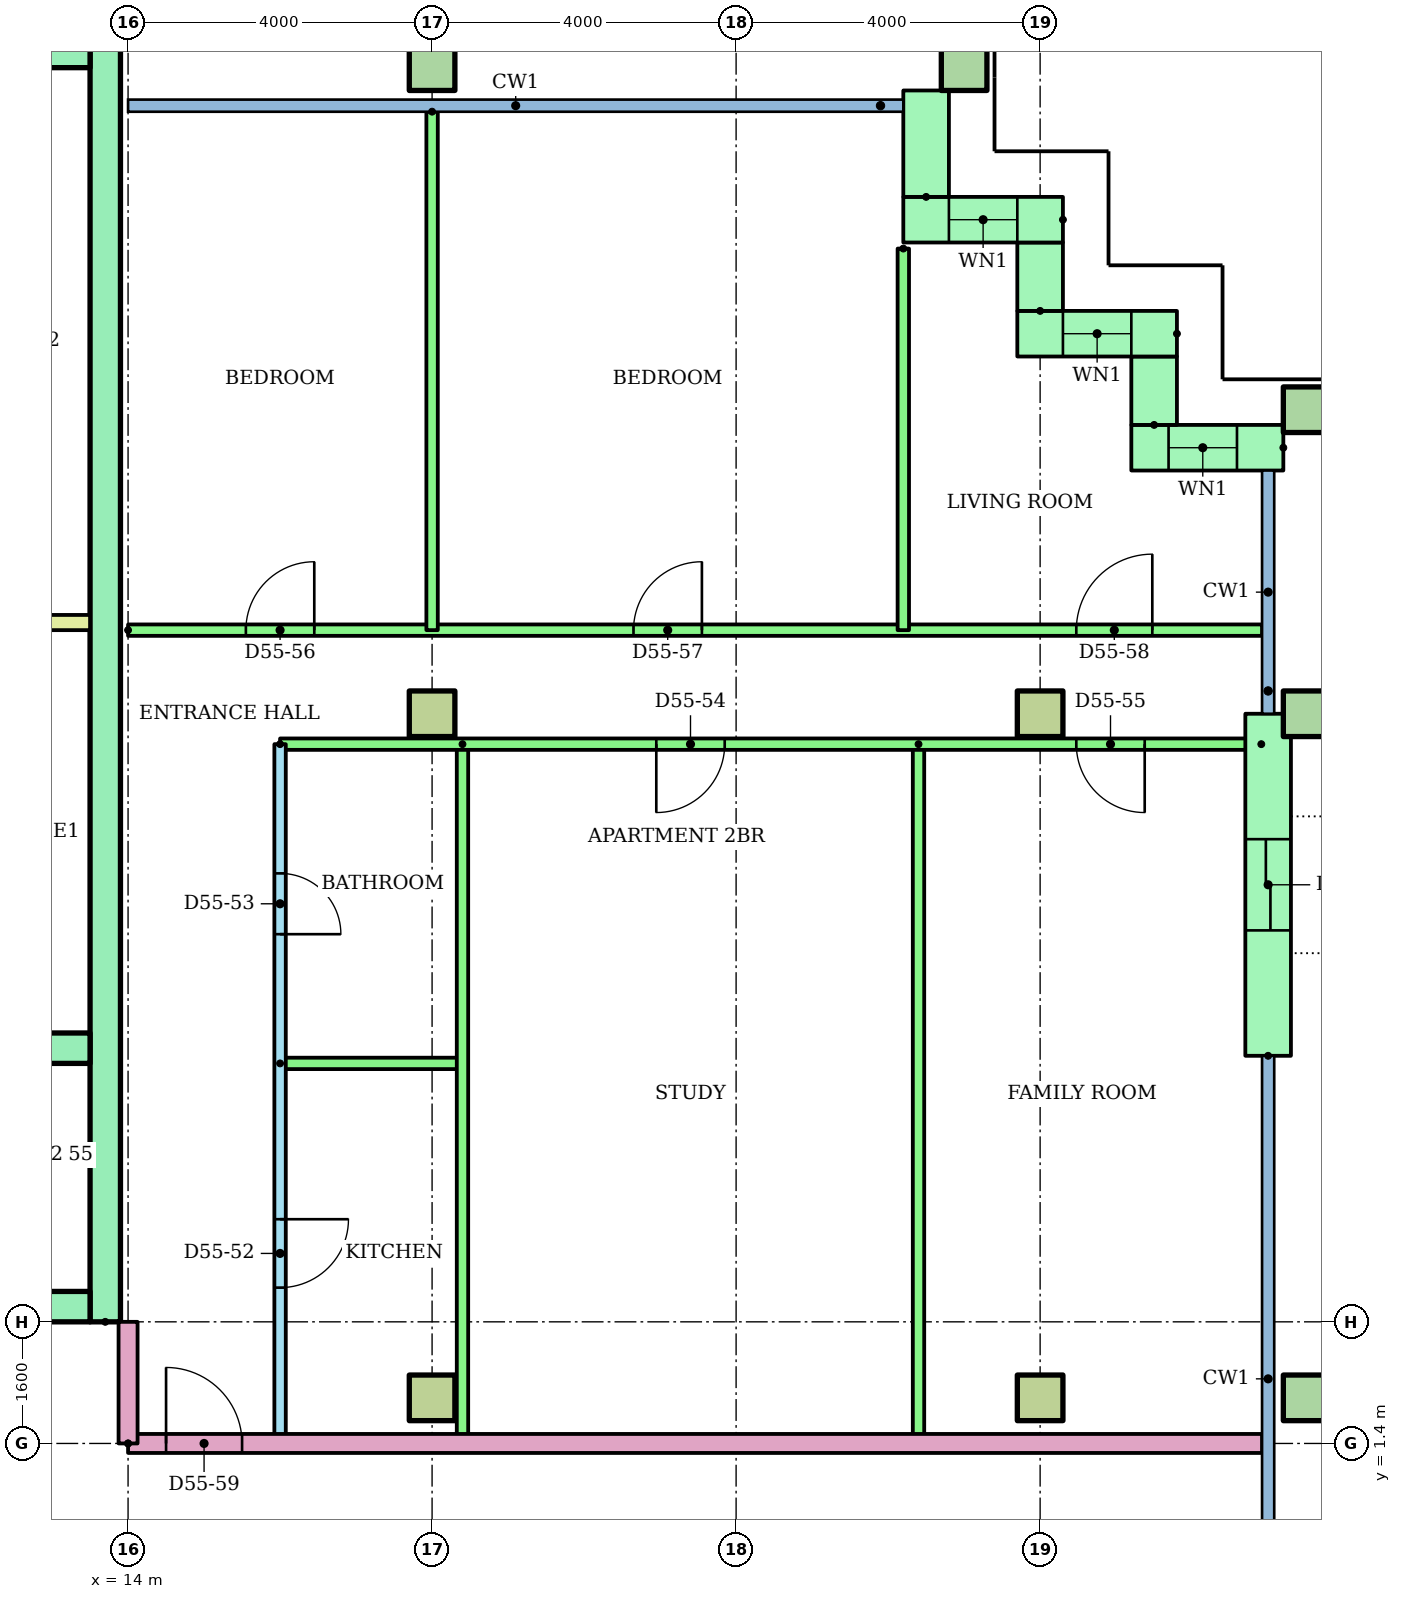
"""IFC4 building model, lengths in metres.
Left out: names, types, materials, properties, quantities, classifications, styles, units other than length and angle.
Written with IfcOpenShell. Run it as: python <this file> out.ifc"""

import sys

from ifc_helpers import new_model, si_unit, direction, frame, frame_2d, origin, origin_2d, place, context, subcontext, project, spatial, rectangle, hollow_rectangle, extrude, element, fill, save


model = new_model("IFC4")
c1 = context("Model", 3, precision=1e-05, world=origin(), true_north=direction((0.0, 1.0)))
c2 = subcontext(c1, "Body", "Model", "MODEL_VIEW")
j1 = project(units=[si_unit("LENGTHUNIT", "METRE"), si_unit("PLANEANGLEUNIT", "RADIAN")], contexts=[c1])
p1 = place(None, origin())
s1 = spatial("IfcSite", under=j1, at=p1, CompositionType="ELEMENT")
p2 = place(p1, origin())
s2 = spatial("IfcBuilding", under=s1, at=p2, CompositionType="ELEMENT")
p3 = place(p2, frame((0.0, 0.0, 214.0)))
s3 = spatial("IfcBuildingStorey", under=s2, at=p3, CompositionType="ELEMENT", Elevation=214.0)
for number, where in (
    (1, (18.0, 2.0, 0.0)),
    (2, (26.0, 2.0, 0.0)),
):
    element("IfcColumn", number, at=place(p3, frame(where)), inside=s3, PredefinedType="COLUMN", context=c2, shape_type="SweptSolid", body=[
        extrude(rectangle(XDim=0.6, YDim=0.6, at=origin_2d()), origin(), (0.0, 0.0, 1.0), 3.2),
    ])
p4 = place(p3, frame((29.5, 2.0, 0.0)))
e3 = element("IfcColumn", 3, at=p4, inside=s3, PredefinedType="COLUMN", context=c2, shape_type="SweptSolid", body=[
    extrude(hollow_rectangle(XDim=0.6, YDim=0.6, WallThickness=0.03, at=origin_2d()), origin(), (0.0, 0.0, 1.0), 3.2),
])
for number, where in (
    (4, (18.0, 11.0, 0.0)),
    (5, (26.0, 11.0, 0.0)),
):
    element("IfcColumn", number, at=place(p3, frame(where)), inside=s3, PredefinedType="COLUMN", context=c2, shape_type="SweptSolid", body=[
        extrude(rectangle(XDim=0.6, YDim=0.6, at=origin_2d()), origin(), (0.0, 0.0, 1.0), 3.2),
    ])
for number, where in (
    (6, (29.5, 11.0, 0.0)),
    (7, (29.5, 15.0, 0.0)),
    (8, (18.0, 19.5, 0.0)),
    (9, (25.0, 19.5, 0.0)),
):
    element("IfcColumn", number, at=place(p3, frame(where)), inside=s3, PredefinedType="COLUMN", context=c2, shape_type="SweptSolid", body=[
        extrude(hollow_rectangle(XDim=0.6, YDim=0.6, WallThickness=0.03, at=origin_2d()), origin(), (0.0, 0.0, 1.0), 3.2),
    ])
p5 = place(p3, frame((29.2, 14.5, 0.0), z_axis=(0.0, 0.0, 1.0), x_axis=(-1.0, 0.0, 0.0)))
e10 = element("IfcWall", 10, at=p5, inside=s3, PredefinedType="STANDARD", context=c2, shape_type="SweptSolid", body=[
    extrude(rectangle(XDim=2.0, YDim=0.6, at=frame_2d((1.0, 0.0))), origin(), (0.0, 0.0, 1.0), 2.92),
])
p6 = place(p5, frame((0.61, 0.0, 0.9)))
e11 = element("IfcOpeningElement", 11, at=p6, cuts=e10, PredefinedType="OPENING", context=c2, shape_type="SweptSolid", body=[
    extrude(rectangle(XDim=0.9, YDim=1.5, at=frame_2d((0.45, 0.75))), frame((0.0, 0.31, 0.0), z_axis=(0.0, -1.0, 0.0), x_axis=(1.0, 0.0, 0.0)), (0.0, 0.0, 1.0), 0.62),
])
p7 = place(p3, frame((27.5, 14.8, 0.0), z_axis=(0.0, 0.0, 1.0), x_axis=(0.0, 1.0, 0.0)))
e12 = element("IfcWall", 12, at=p7, inside=s3, PredefinedType="STANDARD", context=c2, shape_type="SweptSolid", body=[
    extrude(rectangle(XDim=0.9, YDim=0.6, at=frame_2d((0.45, 0.0))), origin(), (0.0, 0.0, 1.0), 2.92),
])
p8 = place(p3, frame((27.8, 16.0, 0.0), z_axis=(0.0, 0.0, 1.0), x_axis=(-1.0, 0.0, 0.0)))
e13 = element("IfcWall", 13, at=p8, inside=s3, PredefinedType="STANDARD", context=c2, shape_type="SweptSolid", body=[
    extrude(rectangle(XDim=2.1, YDim=0.6, at=frame_2d((1.05, 0.0))), origin(), (0.0, 0.0, 1.0), 2.92),
])
p9 = place(p8, frame((0.6, 0.0, 0.9)))
e14 = element("IfcOpeningElement", 14, at=p9, cuts=e13, PredefinedType="OPENING", context=c2, shape_type="SweptSolid", body=[
    extrude(rectangle(XDim=0.9, YDim=1.5, at=frame_2d((0.45, 0.75))), frame((0.0, 0.31, 0.0), z_axis=(0.0, -1.0, 0.0), x_axis=(1.0, 0.0, 0.0)), (0.0, 0.0, 1.0), 0.62),
])
p10 = place(p3, frame((26.0, 16.3, 0.0), z_axis=(0.0, 0.0, 1.0), x_axis=(0.0, 1.0, 0.0)))
e15 = element("IfcWall", 15, at=p10, inside=s3, PredefinedType="STANDARD", context=c2, shape_type="SweptSolid", body=[
    extrude(rectangle(XDim=0.9, YDim=0.6, at=frame_2d((0.45, 0.0))), origin(), (0.0, 0.0, 1.0), 2.92),
])
p11 = place(p3, frame((26.3, 17.5, 0.0), z_axis=(0.0, 0.0, 1.0), x_axis=(-1.0, 0.0, 0.0)))
e16 = element("IfcWall", 16, at=p11, inside=s3, PredefinedType="STANDARD", context=c2, shape_type="SweptSolid", body=[
    extrude(rectangle(XDim=2.1, YDim=0.6, at=frame_2d((1.05, 0.0))), origin(), (0.0, 0.0, 1.0), 2.92),
])
p12 = place(p11, frame((0.6, 0.0, 0.9)))
e17 = element("IfcOpeningElement", 17, at=p12, cuts=e16, PredefinedType="OPENING", context=c2, shape_type="SweptSolid", body=[
    extrude(rectangle(XDim=0.9, YDim=1.5, at=frame_2d((0.45, 0.75))), frame((0.0, 0.31, 0.0), z_axis=(0.0, -1.0, 0.0), x_axis=(1.0, 0.0, 0.0)), (0.0, 0.0, 1.0), 0.62),
])
p13 = place(p3, frame((24.5, 17.8, 0.0), z_axis=(0.0, 0.0, 1.0), x_axis=(0.0, 1.0, 0.0)))
e18 = element("IfcWall", 18, at=p13, inside=s3, PredefinedType="STANDARD", context=c2, shape_type="SweptSolid", body=[
    extrude(rectangle(XDim=1.4, YDim=0.6, at=frame_2d((0.7, 0.0))), origin(), (0.0, 0.0, 1.0), 2.92),
])
p14 = place(p3, frame((29.0, 6.5, 0.0), z_axis=(0.0, 0.0, 1.0), x_axis=(0.0, 1.0, 0.0)))
e19 = element("IfcWall", 19, at=p14, inside=s3, PredefinedType="STANDARD", context=c2, shape_type="SweptSolid", body=[
    extrude(rectangle(XDim=4.5, YDim=0.6, at=frame_2d((2.25, 0.0))), origin(), (0.0, 0.0, 1.0), 2.92),
])
p15 = place(p14, frame((1.65, 0.0, 0.0)))
e20 = element("IfcOpeningElement", 20, at=p15, cuts=e19, PredefinedType="OPENING", context=c2, shape_type="SweptSolid", body=[
    extrude(rectangle(XDim=1.2, YDim=2.1, at=frame_2d((0.6, 1.05))), frame((0.0, 0.31, 0.0), z_axis=(0.0, -1.0, 0.0), x_axis=(1.0, 0.0, 0.0)), (0.0, 0.0, 1.0), 0.62),
])
p16 = place(p3, frame((13.7, 3.0, 0.0), z_axis=(0.0, 0.0, 1.0), x_axis=(0.0, 1.0, 0.0)))
e21 = element("IfcWall", 21, at=p16, inside=s3, PredefinedType="SHEAR", context=c2, shape_type="SweptSolid", body=[
    extrude(rectangle(XDim=17.0, YDim=0.4, at=frame_2d((8.5, 0.0))), origin(), (0.0, 0.0, 1.0), 2.92),
])
p17 = place(p3, frame((-13.5, 19.7, 0.0)))
e22 = element("IfcWall", 22, at=p17, inside=s3, PredefinedType="SHEAR", context=c2, shape_type="SweptSolid", body=[
    extrude(rectangle(XDim=27.0, YDim=0.4, at=frame_2d((13.5, 0.0))), origin(), (0.0, 0.0, 1.0), 2.92),
])
p18 = place(p3, frame((-13.5, 3.2, 0.0)))
e23 = element("IfcWall", 23, at=p18, inside=s3, PredefinedType="SHEAR", context=c2, shape_type="SweptSolid", body=[
    extrude(rectangle(XDim=27.0, YDim=0.4, at=frame_2d((13.5, 0.0))), origin(), (0.0, 0.0, 1.0), 2.92),
])
p19 = place(p18, frame((22.083, 0.0, 0.0)))
e24 = element("IfcOpeningElement", 24, at=p19, cuts=e23, PredefinedType="OPENING", context=c2, shape_type="SweptSolid", body=[
    extrude(rectangle(XDim=1.1, YDim=2.1, at=frame_2d((0.55, 1.05))), frame((0.0, 0.21, 0.0), z_axis=(0.0, -1.0, 0.0), x_axis=(1.0, 0.0, 0.0)), (0.0, 0.0, 1.0), 0.42),
])
p20 = place(p18, frame((25.128, 0.0, 0.0)))
e25 = element("IfcOpeningElement", 25, at=p20, cuts=e23, PredefinedType="OPENING", context=c2, shape_type="SweptSolid", body=[
    extrude(rectangle(XDim=1.1, YDim=2.1, at=frame_2d((0.55, 1.05))), frame((0.0, 0.21, 0.0), z_axis=(0.0, -1.0, 0.0), x_axis=(1.0, 0.0, 0.0)), (0.0, 0.0, 1.0), 0.42),
])
p21 = place(p18, frame((12.6, 0.0, 0.0)))
e26 = element("IfcOpeningElement", 26, at=p21, cuts=e23, PredefinedType="OPENING", context=c2, shape_type="SweptSolid", body=[
    extrude(rectangle(XDim=1.8, YDim=2.1, at=frame_2d((0.9, 1.05))), frame((0.0, 0.21, 0.0), z_axis=(0.0, -1.0, 0.0), x_axis=(1.0, 0.0, 0.0)), (0.0, 0.0, 1.0), 0.42),
])
p22 = place(p3, frame((1.522, 6.6, 0.0)))
e27 = element("IfcWall", 27, at=p22, inside=s3, PredefinedType="SHEAR", context=c2, shape_type="SweptSolid", body=[
    extrude(rectangle(XDim=11.978, YDim=0.4, at=frame_2d((5.989, 0.0))), origin(), (0.0, 0.0, 1.0), 2.92),
])
p23 = place(p22, frame((2.544, 0.0, 0.0)))
e28 = element("IfcOpeningElement", 28, at=p23, cuts=e27, PredefinedType="OPENING", context=c2, shape_type="SweptSolid", body=[
    extrude(rectangle(XDim=1.0, YDim=2.1, at=frame_2d((0.5, 1.05))), frame((0.0, 0.21, 0.0), z_axis=(0.0, -1.0, 0.0), x_axis=(1.0, 0.0, 0.0)), (0.0, 0.0, 1.0), 0.42),
])
p24 = place(p3, frame((9.6, 12.2, 0.0)))
e29 = element("IfcWall", 29, at=p24, inside=s3, PredefinedType="PARTITIONING", context=c2, shape_type="SweptSolid", body=[
    extrude(rectangle(XDim=3.9, YDim=0.2, at=frame_2d((1.95, 0.0))), origin(), (0.0, 0.0, 1.0), 2.92),
])
p25 = place(p3, frame((16.0, 10.6, 0.0), z_axis=(0.0, 0.0, 1.0), x_axis=(0.0, -1.0, 0.0)))
e30 = element("IfcWall", 30, at=p25, inside=s3, PredefinedType="PARTITIONING", context=c2, shape_type="SweptSolid", body=[
    extrude(rectangle(XDim=9.2, YDim=0.15, at=frame_2d((4.6, 0.0))), origin(), (0.0, 0.0, 1.0), 2.4),
])
p26 = place(p25, frame((6.25, 0.0, 0.0)))
e31 = element("IfcOpeningElement", 31, at=p26, cuts=e30, PredefinedType="OPENING", context=c2, shape_type="SweptSolid", body=[
    extrude(rectangle(XDim=0.9, YDim=2.1, at=frame_2d((0.45, 1.05))), frame((0.0, 0.085, 0.0), z_axis=(0.0, -1.0, 0.0), x_axis=(1.0, 0.0, 0.0)), (0.0, 0.0, 1.0), 0.17),
])
p27 = place(p25, frame((1.7, 0.0, 0.0)))
e32 = element("IfcOpeningElement", 32, at=p27, cuts=e30, PredefinedType="OPENING", context=c2, shape_type="SweptSolid", body=[
    extrude(rectangle(XDim=0.8, YDim=2.1, at=frame_2d((0.4, 1.05))), frame((0.0, 0.085, 0.0), z_axis=(0.0, -1.0, 0.0), x_axis=(1.0, 0.0, 0.0)), (0.0, 0.0, 1.0), 0.17),
])
p28 = place(p3, frame((16.0, 6.4, 0.0)))
e33 = element("IfcWall", 33, at=p28, inside=s3, PredefinedType="PARTITIONING", context=c2, shape_type="SweptSolid", body=[
    extrude(rectangle(XDim=2.4, YDim=0.15, at=frame_2d((1.2, 0.0))), origin(), (0.0, 0.0, 1.0), 2.4),
])
for number, where, z_axis, x_axis in (
    (34, (18.4, 10.6, 0.0), (0.0, 0.0, 1.0), (0.0, -1.0, 0.0)),
    (35, (24.4, 10.6, 0.0), (0.0, 0.0, 1.0), (0.0, -1.0, 0.0)),
):
    element("IfcWall", number, at=place(p3, frame(where, z_axis=z_axis, x_axis=x_axis)), inside=s3, PredefinedType="PARTITIONING", context=c2, shape_type="SweptSolid", body=[
        extrude(rectangle(XDim=9.2, YDim=0.15, at=frame_2d((4.6, 0.0))), origin(), (0.0, 0.0, 1.0), 2.4),
    ])
p29 = place(p3, frame((28.91, 10.6, 0.0), z_axis=(0.0, 0.0, 1.0), x_axis=(-1.0, 0.0, 0.0)))
e36 = element("IfcWall", 36, at=p29, inside=s3, PredefinedType="PARTITIONING", context=c2, shape_type="SweptSolid", body=[
    extrude(rectangle(XDim=12.91, YDim=0.15, at=frame_2d((6.455, 0.0))), origin(), (0.0, 0.0, 1.0), 2.4),
])
p30 = place(p29, frame((7.06, 0.0, 0.0)))
e37 = element("IfcOpeningElement", 37, at=p30, cuts=e36, PredefinedType="OPENING", context=c2, shape_type="SweptSolid", body=[
    extrude(rectangle(XDim=0.9, YDim=2.1, at=frame_2d((0.45, 1.05))), frame((0.0, 0.085, 0.0), z_axis=(0.0, -1.0, 0.0), x_axis=(1.0, 0.0, 0.0)), (0.0, 0.0, 1.0), 0.17),
])
p31 = place(p29, frame((1.534, 0.0, 0.0)))
e38 = element("IfcOpeningElement", 38, at=p31, cuts=e36, PredefinedType="OPENING", context=c2, shape_type="SweptSolid", body=[
    extrude(rectangle(XDim=0.9, YDim=2.1, at=frame_2d((0.45, 1.05))), frame((0.0, 0.085, 0.0), z_axis=(0.0, -1.0, 0.0), x_axis=(1.0, 0.0, 0.0)), (0.0, 0.0, 1.0), 0.17),
])
p32 = place(p3, frame((14.0, 12.1, 0.0)))
e39 = element("IfcWall", 39, at=p32, inside=s3, PredefinedType="PARTITIONING", context=c2, shape_type="SweptSolid", body=[
    extrude(rectangle(XDim=14.92, YDim=0.15, at=frame_2d((7.46, 0.0))), origin(), (0.0, 0.0, 1.0), 2.4),
])
p33 = place(p32, frame((1.55, 0.0, 0.0)))
e40 = element("IfcOpeningElement", 40, at=p33, cuts=e39, PredefinedType="OPENING", context=c2, shape_type="SweptSolid", body=[
    extrude(rectangle(XDim=0.9, YDim=2.1, at=frame_2d((0.45, 1.05))), frame((0.0, 0.085, 0.0), z_axis=(0.0, -1.0, 0.0), x_axis=(1.0, 0.0, 0.0)), (0.0, 0.0, 1.0), 0.17),
])
p34 = place(p32, frame((6.65, 0.0, 0.0)))
e41 = element("IfcOpeningElement", 41, at=p34, cuts=e39, PredefinedType="OPENING", context=c2, shape_type="SweptSolid", body=[
    extrude(rectangle(XDim=0.9, YDim=2.1, at=frame_2d((0.45, 1.05))), frame((0.0, 0.085, 0.0), z_axis=(0.0, -1.0, 0.0), x_axis=(1.0, 0.0, 0.0)), (0.0, 0.0, 1.0), 0.17),
])
p35 = place(p32, frame((12.476, 0.0, 0.0)))
e42 = element("IfcOpeningElement", 42, at=p35, cuts=e39, PredefinedType="OPENING", context=c2, shape_type="SweptSolid", body=[
    extrude(rectangle(XDim=1.0, YDim=2.1, at=frame_2d((0.5, 1.05))), frame((0.0, 0.085, 0.0), z_axis=(0.0, -1.0, 0.0), x_axis=(1.0, 0.0, 0.0)), (0.0, 0.0, 1.0), 0.17),
])
p36 = place(p3, frame((18.0, 18.921, 0.0), z_axis=(0.0, 0.0, 1.0), x_axis=(0.0, -1.0, 0.0)))
e43 = element("IfcWall", 43, at=p36, inside=s3, PredefinedType="PARTITIONING", context=c2, shape_type="SweptSolid", body=[
    extrude(rectangle(XDim=6.821, YDim=0.15, at=frame_2d((3.41, 0.0))), origin(), (0.0, 0.0, 1.0), 2.4),
])
p37 = place(p3, frame((24.2, 17.12, 0.0), z_axis=(0.0, 0.0, 1.0), x_axis=(0.0, -1.0, 0.0)))
e44 = element("IfcWall", 44, at=p37, inside=s3, PredefinedType="PARTITIONING", context=c2, shape_type="SweptSolid", body=[
    extrude(rectangle(XDim=5.02, YDim=0.15, at=frame_2d((2.51, 0.0))), origin(), (0.0, 0.0, 1.0), 2.4),
])
p38 = place(p3, frame((14.0, 1.4, 0.0)))
e45 = element("IfcWall", 45, at=p38, inside=s3, PredefinedType="PARTITIONING", context=c2, shape_type="SweptSolid", body=[
    extrude(rectangle(XDim=14.92, YDim=0.25, at=frame_2d((7.46, 0.0))), origin(), (0.0, 0.0, 1.0), 2.4),
])
p39 = place(p38, frame((0.5, 0.0, 0.0)))
e46 = element("IfcOpeningElement", 46, at=p39, cuts=e45, PredefinedType="OPENING", context=c2, shape_type="SweptSolid", body=[
    extrude(rectangle(XDim=1.0, YDim=2.1, at=frame_2d((0.5, 1.05))), frame((0.0, 0.135, 0.0), z_axis=(0.0, -1.0, 0.0), x_axis=(1.0, 0.0, 0.0)), (0.0, 0.0, 1.0), 0.27),
])
p40 = place(p3, frame((14.0, 1.4, 0.0), z_axis=(0.0, 0.0, 1.0), x_axis=(0.0, 1.0, 0.0)))
e47 = element("IfcWall", 47, at=p40, inside=s3, PredefinedType="PARTITIONING", context=c2, shape_type="SweptSolid", body=[
    extrude(rectangle(XDim=1.6, YDim=0.25, at=frame_2d((0.8, 0.0))), origin(), (0.0, 0.0, 1.0), 2.4),
])
p41 = place(p6, origin())
e48 = element("IfcWindow", 48, at=p41, inside=s3, PartitioningType="SINGLE_PANEL", PredefinedType="WINDOW", context=c2, shape_type="SweptSolid", body=[
    extrude(rectangle(XDim=0.9, YDim=1.5, at=frame_2d((0.45, 0.75))), frame((0.0, 0.03, 0.0), z_axis=(0.0, -1.0, 0.0), x_axis=(1.0, 0.0, 0.0)), (0.0, 0.0, 1.0), 0.06),
])
fill(e11, e48)
p42 = place(p9, origin())
e49 = element("IfcWindow", 49, at=p42, inside=s3, PartitioningType="SINGLE_PANEL", PredefinedType="WINDOW", context=c2, shape_type="SweptSolid", body=[
    extrude(rectangle(XDim=0.9, YDim=1.5, at=frame_2d((0.45, 0.75))), frame((0.0, 0.03, 0.0), z_axis=(0.0, -1.0, 0.0), x_axis=(1.0, 0.0, 0.0)), (0.0, 0.0, 1.0), 0.06),
])
fill(e14, e49)
p43 = place(p12, origin())
e50 = element("IfcWindow", 50, at=p43, inside=s3, PartitioningType="SINGLE_PANEL", PredefinedType="WINDOW", context=c2, shape_type="SweptSolid", body=[
    extrude(rectangle(XDim=0.9, YDim=1.5, at=frame_2d((0.45, 0.75))), frame((0.0, 0.03, 0.0), z_axis=(0.0, -1.0, 0.0), x_axis=(1.0, 0.0, 0.0)), (0.0, 0.0, 1.0), 0.06),
])
fill(e17, e50)
p44 = place(p26, origin())
e51 = element("IfcDoor", 51, at=p44, inside=s3, OperationType="SINGLE_SWING_LEFT", PredefinedType="DOOR", context=c2, shape_type="SweptSolid", body=[
    extrude(rectangle(XDim=0.9, YDim=2.1, at=frame_2d((0.45, 1.05))), frame((0.0, 0.025, 0.0), z_axis=(0.0, -1.0, 0.0), x_axis=(1.0, 0.0, 0.0)), (0.0, 0.0, 1.0), 0.05),
])
fill(e31, e51)
p45 = place(p27, origin())
e52 = element("IfcDoor", 52, at=p45, inside=s3, OperationType="SINGLE_SWING_RIGHT", PredefinedType="DOOR", context=c2, shape_type="SweptSolid", body=[
    extrude(rectangle(XDim=0.8, YDim=2.1, at=frame_2d((0.4, 1.05))), frame((0.0, 0.025, 0.0), z_axis=(0.0, -1.0, 0.0), x_axis=(1.0, 0.0, 0.0)), (0.0, 0.0, 1.0), 0.05),
])
fill(e32, e52)
p46 = place(p30, origin())
e53 = element("IfcDoor", 53, at=p46, inside=s3, OperationType="SINGLE_SWING_RIGHT", PredefinedType="DOOR", context=c2, shape_type="SweptSolid", body=[
    extrude(rectangle(XDim=0.9, YDim=2.1, at=frame_2d((0.45, 1.05))), frame((0.0, 0.025, 0.0), z_axis=(0.0, -1.0, 0.0), x_axis=(1.0, 0.0, 0.0)), (0.0, 0.0, 1.0), 0.05),
])
fill(e37, e53)
p47 = place(p31, origin())
e54 = element("IfcDoor", 54, at=p47, inside=s3, OperationType="SINGLE_SWING_LEFT", PredefinedType="DOOR", context=c2, shape_type="SweptSolid", body=[
    extrude(rectangle(XDim=0.9, YDim=2.1, at=frame_2d((0.45, 1.05))), frame((0.0, 0.025, 0.0), z_axis=(0.0, -1.0, 0.0), x_axis=(1.0, 0.0, 0.0)), (0.0, 0.0, 1.0), 0.05),
])
fill(e38, e54)
p48 = place(p33, origin())
e55 = element("IfcDoor", 55, at=p48, inside=s3, OperationType="SINGLE_SWING_RIGHT", PredefinedType="DOOR", context=c2, shape_type="SweptSolid", body=[
    extrude(rectangle(XDim=0.9, YDim=2.1, at=frame_2d((0.45, 1.05))), frame((0.0, 0.025, 0.0), z_axis=(0.0, -1.0, 0.0), x_axis=(1.0, 0.0, 0.0)), (0.0, 0.0, 1.0), 0.05),
])
fill(e40, e55)
p49 = place(p34, origin())
e56 = element("IfcDoor", 56, at=p49, inside=s3, OperationType="SINGLE_SWING_RIGHT", PredefinedType="DOOR", context=c2, shape_type="SweptSolid", body=[
    extrude(rectangle(XDim=0.9, YDim=2.1, at=frame_2d((0.45, 1.05))), frame((0.0, 0.025, 0.0), z_axis=(0.0, -1.0, 0.0), x_axis=(1.0, 0.0, 0.0)), (0.0, 0.0, 1.0), 0.05),
])
fill(e41, e56)
p50 = place(p35, origin())
e57 = element("IfcDoor", 57, at=p50, inside=s3, OperationType="SINGLE_SWING_RIGHT", PredefinedType="DOOR", context=c2, shape_type="SweptSolid", body=[
    extrude(rectangle(XDim=1.0, YDim=2.1, at=frame_2d((0.5, 1.05))), frame((0.0, 0.025, 0.0), z_axis=(0.0, -1.0, 0.0), x_axis=(1.0, 0.0, 0.0)), (0.0, 0.0, 1.0), 0.05),
])
fill(e42, e57)
p51 = place(p39, origin())
e58 = element("IfcDoor", 58, at=p51, inside=s3, OperationType="SINGLE_SWING_LEFT", PredefinedType="DOOR", context=c2, shape_type="SweptSolid", body=[
    extrude(rectangle(XDim=1.0, YDim=2.1, at=frame_2d((0.5, 1.05))), frame((0.0, 0.025, 0.0), z_axis=(0.0, -1.0, 0.0), x_axis=(1.0, 0.0, 0.0)), (0.0, 0.0, 1.0), 0.05),
])
fill(e46, e58)
p52 = place(p15, origin())
e59 = element("IfcDoor", 59, at=p52, inside=s3, OperationType="SLIDING_TO_LEFT", PredefinedType="DOOR", context=c2, shape_type="SweptSolid", body=[
    extrude(rectangle(XDim=1.2, YDim=2.1, at=frame_2d((0.6, 1.05))), frame((0.0, 0.025, 0.0), z_axis=(0.0, -1.0, 0.0), x_axis=(1.0, 0.0, 0.0)), (0.0, 0.0, 1.0), 0.05),
])
fill(e20, e59)
save(model, sys.argv[1])
